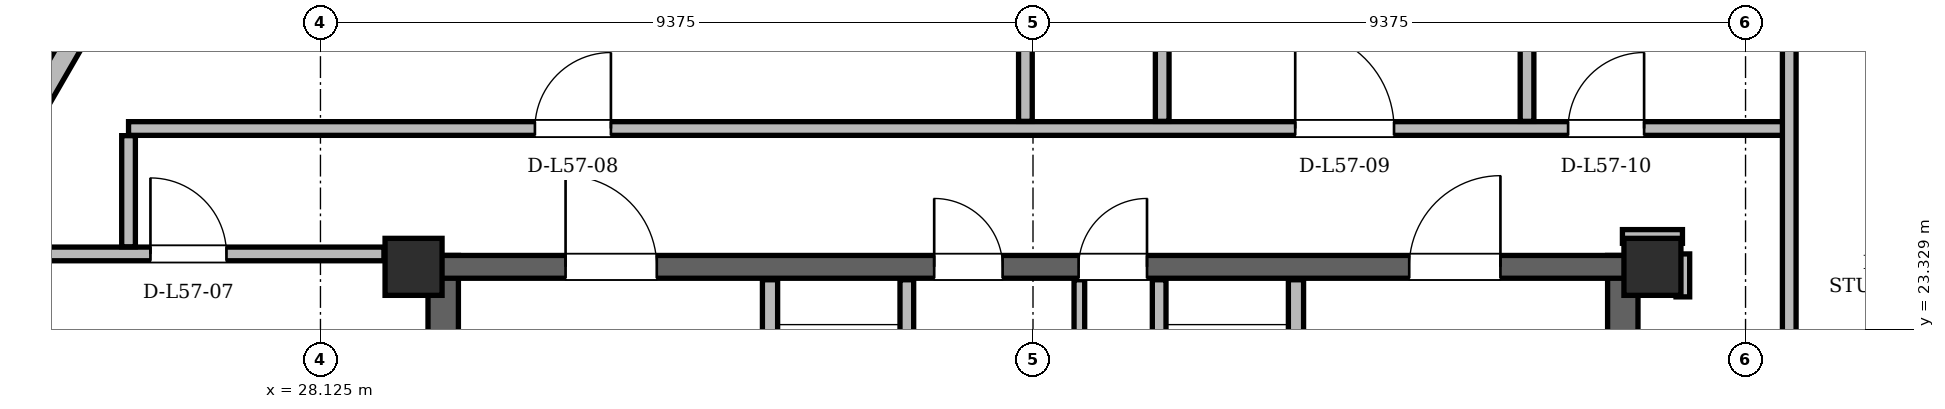
"""IFC4 building model, lengths in metres.
Left out: names, types, materials, properties, quantities, classifications, styles, units other than length and angle.
Written with IfcOpenShell. Run it as: python <this file> out.ifc"""

import sys

from ifc_helpers import new_model, si_unit, direction, frame, frame_2d, origin, origin_2d, place, context, subcontext, project, spatial, rectangle, hollow_rectangle, extrude, element, fill, save


model = new_model("IFC4")
c1 = context("Model", 3, precision=1e-05, world=origin(), true_north=direction((0.0, 1.0)))
c2 = subcontext(c1, "Body", "Model", "MODEL_VIEW")
j1 = project(units=[si_unit("LENGTHUNIT", "METRE"), si_unit("PLANEANGLEUNIT", "RADIAN")], contexts=[c1])
p1 = place(None, origin())
s1 = spatial("IfcSite", under=j1, at=p1, CompositionType="ELEMENT")
p2 = place(p1, origin())
s2 = spatial("IfcBuilding", under=s1, at=p2, CompositionType="ELEMENT")
p3 = place(p2, frame((0.0, 0.0, 216.3)))
s3 = spatial("IfcBuildingStorey", under=s2, at=p3, CompositionType="ELEMENT", Elevation=216.3)
for number, where, z_axis, x_axis in (
    (1, (45.65, 24.15, 0.0), (0.0, 0.0, 1.0), (1.0, 0.0, 0.0)),
    (2, (29.35, 24.15, 0.0), (0.0, 0.0, 1.0), (1.0, 0.0, 0.0)),
):
    element("IfcColumn", number, at=place(p3, frame(where, z_axis=z_axis, x_axis=x_axis)), inside=s3, PredefinedType="COLUMN", context=c2, shape_type="SweptSolid", body=[
        extrude(hollow_rectangle(XDim=0.75, YDim=0.75, WallThickness=0.06, at=origin_2d()), origin(), (0.0, 0.0, 1.0), 3.6),
    ])
for number, where, z_axis, x_axis in (
    (3, (29.74, 11.0, 0.0), (0.0, 0.0, 1.0), (0.0, 1.0, 0.0)),
    (4, (45.26, 11.0, 0.0), (0.0, 0.0, 1.0), (0.0, 1.0, 0.0)),
):
    element("IfcWall", number, at=place(p3, frame(where, z_axis=z_axis, x_axis=x_axis)), inside=s3, PredefinedType="SHEAR", context=c2, shape_type="SweptSolid", body=[
        extrude(rectangle(XDim=13.3, YDim=0.4, at=frame_2d((6.65, 0.0))), origin(), (0.0, 0.0, 1.0), 3.38),
    ])
p4 = place(p3, frame((29.65, 24.15, 0.0), z_axis=(0.0, 0.0, 1.0), x_axis=(1.0, 0.0, 0.0)))
e5 = element("IfcWall", 5, at=p4, inside=s3, PredefinedType="SHEAR", context=c2, shape_type="SweptSolid", body=[
    extrude(rectangle(XDim=15.7, YDim=0.3, at=frame_2d((7.85, 0.0))), origin(), (0.0, 0.0, 1.0), 3.38),
])
p5 = place(p4, frame((1.7, 0.0, 0.0)))
e6 = element("IfcOpeningElement", 6, at=p5, cuts=e5, PredefinedType="OPENING", context=c2, shape_type="SweptSolid", body=[
    extrude(rectangle(XDim=1.2, YDim=2.2, at=frame_2d((0.6, 1.1))), frame((0.0, 0.15, 0.0), z_axis=(0.0, -1.0, 0.0), x_axis=(1.0, 0.0, 0.0)), (0.0, 0.0, 1.0), 0.3),
])
p6 = place(p4, frame((12.8, 0.0, 0.0)))
e7 = element("IfcOpeningElement", 7, at=p6, cuts=e5, PredefinedType="OPENING", context=c2, shape_type="SweptSolid", body=[
    extrude(rectangle(XDim=1.2, YDim=2.2, at=frame_2d((0.6, 1.1))), frame((0.0, 0.15, 0.0), z_axis=(0.0, -1.0, 0.0), x_axis=(1.0, 0.0, 0.0)), (0.0, 0.0, 1.0), 0.3),
])
p7 = place(p4, frame((6.55, 0.0, 0.0)))
e8 = element("IfcOpeningElement", 8, at=p7, cuts=e5, PredefinedType="OPENING", context=c2, shape_type="SweptSolid", body=[
    extrude(rectangle(XDim=0.9, YDim=2.05, at=frame_2d((0.45, 1.025))), frame((0.0, 0.15, 0.0), z_axis=(0.0, -1.0, 0.0), x_axis=(1.0, 0.0, 0.0)), (0.0, 0.0, 1.0), 0.3),
])
p8 = place(p4, frame((8.45, 0.0, 0.0)))
e9 = element("IfcOpeningElement", 9, at=p8, cuts=e5, PredefinedType="OPENING", context=c2, shape_type="SweptSolid", body=[
    extrude(rectangle(XDim=0.9, YDim=2.05, at=frame_2d((0.45, 1.025))), frame((0.0, 0.15, 0.0), z_axis=(0.0, -1.0, 0.0), x_axis=(1.0, 0.0, 0.0)), (0.0, 0.0, 1.0), 0.3),
])
p9 = place(p3, frame((59.157, 11.485, 0.0), z_axis=(0.0, 0.0, 1.0), x_axis=(-0.500000353019, 0.866025199969, 0.0)))
e10 = element("IfcWall", 10, at=p9, inside=s3, PredefinedType="SOLIDWALL", context=c2, shape_type="SweptSolid", body=[
    extrude(rectangle(XDim=36.579, YDim=0.29, at=frame_2d((18.289, 0.0))), origin(), (0.0, 0.0, 1.0), 2.677),
])
p10 = place(p9, frame((3.429, 0.0, 0.0)))
e11 = element("IfcOpeningElement", 11, at=p10, cuts=e10, PredefinedType="OPENING", context=c2, shape_type="SweptSolid", body=[
    extrude(rectangle(XDim=1.5, YDim=2.2, at=frame_2d((0.75, 1.1))), frame((0.0, 0.145, 0.0), z_axis=(0.0, -1.0, 0.0), x_axis=(1.0, 0.0, 0.0)), (0.0, 0.0, 1.0), 0.29),
])
p11 = place(p9, frame((27.044, 0.0, 0.0)))
e12 = element("IfcOpeningElement", 12, at=p11, cuts=e10, PredefinedType="OPENING", context=c2, shape_type="SweptSolid", body=[
    extrude(rectangle(XDim=1.5, YDim=2.2, at=frame_2d((0.75, 1.1))), frame((0.0, 0.145, 0.0), z_axis=(0.0, -1.0, 0.0), x_axis=(1.0, 0.0, 0.0)), (0.0, 0.0, 1.0), 0.29),
])
p12 = place(p9, frame((7.913, 0.0, 0.85)))
e13 = element("IfcOpeningElement", 13, at=p12, cuts=e10, PredefinedType="OPENING", context=c2, shape_type="SweptSolid", body=[
    extrude(rectangle(XDim=1.2, YDim=1.48, at=frame_2d((0.6, 0.74))), frame((0.0, 0.145, 0.0), z_axis=(0.0, -1.0, 0.0), x_axis=(1.0, 0.0, 0.0)), (0.0, 0.0, 1.0), 0.29),
])
p13 = place(p9, frame((1.258, 0.0, 0.85)))
e14 = element("IfcOpeningElement", 14, at=p13, cuts=e10, PredefinedType="OPENING", context=c2, shape_type="SweptSolid", body=[
    extrude(rectangle(XDim=1.2, YDim=1.48, at=frame_2d((0.6, 0.74))), frame((0.0, 0.145, 0.0), z_axis=(0.0, -1.0, 0.0), x_axis=(1.0, 0.0, 0.0)), (0.0, 0.0, 1.0), 0.29),
])
p14 = place(p9, frame((12.2, 0.0, 0.85)))
e15 = element("IfcOpeningElement", 15, at=p14, cuts=e10, PredefinedType="OPENING", context=c2, shape_type="SweptSolid", body=[
    extrude(rectangle(XDim=2.0, YDim=1.717, at=frame_2d((1.0, 0.858))), frame((0.0, 0.145, 0.0), z_axis=(0.0, -1.0, 0.0), x_axis=(1.0, 0.0, 0.0)), (0.0, 0.0, 1.0), 0.29),
])
p15 = place(p9, frame((17.302, 0.0, 0.85)))
e16 = element("IfcOpeningElement", 16, at=p15, cuts=e10, PredefinedType="OPENING", context=c2, shape_type="SweptSolid", body=[
    extrude(rectangle(XDim=1.4, YDim=1.6, at=frame_2d((0.7, 0.8))), frame((0.0, 0.145, 0.0), z_axis=(0.0, -1.0, 0.0), x_axis=(1.0, 0.0, 0.0)), (0.0, 0.0, 1.0), 0.29),
])
p16 = place(p9, frame((20.753, 0.0, 0.85)))
e17 = element("IfcOpeningElement", 17, at=p16, cuts=e10, PredefinedType="OPENING", context=c2, shape_type="SweptSolid", body=[
    extrude(rectangle(XDim=1.2, YDim=1.48, at=frame_2d((0.6, 0.74))), frame((0.0, 0.145, 0.0), z_axis=(0.0, -1.0, 0.0), x_axis=(1.0, 0.0, 0.0)), (0.0, 0.0, 1.0), 0.29),
])
p17 = place(p9, frame((34.201, 0.0, 0.85)))
e18 = element("IfcOpeningElement", 18, at=p17, cuts=e10, PredefinedType="OPENING", context=c2, shape_type="SweptSolid", body=[
    extrude(rectangle(XDim=1.2, YDim=1.48, at=frame_2d((0.6, 0.74))), frame((0.0, 0.145, 0.0), z_axis=(0.0, -1.0, 0.0), x_axis=(1.0, 0.0, 0.0)), (0.0, 0.0, 1.0), 0.29),
])
p18 = place(p3, frame((34.132, 43.163, 0.0), z_axis=(0.0, 0.0, 1.0), x_axis=(-0.500000353019, -0.866025199969, 0.0)))
e19 = element("IfcWall", 19, at=p18, inside=s3, PredefinedType="SOLIDWALL", context=c2, shape_type="SweptSolid", body=[
    extrude(rectangle(XDim=36.579, YDim=0.29, at=frame_2d((18.289, 0.0))), origin(), (0.0, 0.0, 1.0), 2.677),
])
p19 = place(p18, frame((3.429, 0.0, 0.0)))
e20 = element("IfcOpeningElement", 20, at=p19, cuts=e19, PredefinedType="OPENING", context=c2, shape_type="SweptSolid", body=[
    extrude(rectangle(XDim=1.5, YDim=2.2, at=frame_2d((0.75, 1.1))), frame((0.0, 0.145, 0.0), z_axis=(0.0, -1.0, 0.0), x_axis=(1.0, 0.0, 0.0)), (0.0, 0.0, 1.0), 0.29),
])
p20 = place(p18, frame((27.044, 0.0, 0.0)))
e21 = element("IfcOpeningElement", 21, at=p20, cuts=e19, PredefinedType="OPENING", context=c2, shape_type="SweptSolid", body=[
    extrude(rectangle(XDim=1.5, YDim=2.2, at=frame_2d((0.75, 1.1))), frame((0.0, 0.145, 0.0), z_axis=(0.0, -1.0, 0.0), x_axis=(1.0, 0.0, 0.0)), (0.0, 0.0, 1.0), 0.29),
])
p21 = place(p18, frame((22.914, 0.0, 0.85)))
e22 = element("IfcOpeningElement", 22, at=p21, cuts=e19, PredefinedType="OPENING", context=c2, shape_type="SweptSolid", body=[
    extrude(rectangle(XDim=1.2, YDim=1.48, at=frame_2d((0.6, 0.74))), frame((0.0, 0.145, 0.0), z_axis=(0.0, -1.0, 0.0), x_axis=(1.0, 0.0, 0.0)), (0.0, 0.0, 1.0), 0.29),
])
p22 = place(p18, frame((33.08, 0.0, 0.85)))
e23 = element("IfcOpeningElement", 23, at=p22, cuts=e19, PredefinedType="OPENING", context=c2, shape_type="SweptSolid", body=[
    extrude(rectangle(XDim=1.2, YDim=1.48, at=frame_2d((0.6, 0.74))), frame((0.0, 0.145, 0.0), z_axis=(0.0, -1.0, 0.0), x_axis=(1.0, 0.0, 0.0)), (0.0, 0.0, 1.0), 0.29),
])
p23 = place(p18, frame((8.479, 0.0, 0.85)))
e24 = element("IfcOpeningElement", 24, at=p23, cuts=e19, PredefinedType="OPENING", context=c2, shape_type="SweptSolid", body=[
    extrude(rectangle(XDim=1.2, YDim=1.48, at=frame_2d((0.6, 0.74))), frame((0.0, 0.145, 0.0), z_axis=(0.0, -1.0, 0.0), x_axis=(1.0, 0.0, 0.0)), (0.0, 0.0, 1.0), 0.29),
])
p24 = place(p18, frame((15.537, 0.0, 0.85)))
e25 = element("IfcOpeningElement", 25, at=p24, cuts=e19, PredefinedType="OPENING", context=c2, shape_type="SweptSolid", body=[
    extrude(rectangle(XDim=2.8, YDim=1.717, at=frame_2d((1.4, 0.858))), frame((0.0, 0.145, 0.0), z_axis=(0.0, -1.0, 0.0), x_axis=(1.0, 0.0, 0.0)), (0.0, 0.0, 1.0), 0.29),
])
p25 = place(p18, frame((1.501, 0.0, 0.85)))
e26 = element("IfcOpeningElement", 26, at=p25, cuts=e19, PredefinedType="OPENING", context=c2, shape_type="SweptSolid", body=[
    extrude(rectangle(XDim=1.2, YDim=1.48, at=frame_2d((0.6, 0.74))), frame((0.0, 0.145, 0.0), z_axis=(0.0, -1.0, 0.0), x_axis=(1.0, 0.0, 0.0)), (0.0, 0.0, 1.0), 0.29),
])
p26 = place(p3, frame((34.04, 19.48, 0.0), z_axis=(0.0, 0.0, 1.0), x_axis=(0.0, 1.0, 0.0)))
e27 = element("IfcWall", 27, at=p26, inside=s3, PredefinedType="PARTITIONING", context=c2, shape_type="SweptSolid", body=[
    extrude(rectangle(XDim=4.5, YDim=0.2, at=frame_2d((2.25, 0.0))), origin(), (0.0, 0.0, 1.0), 3.38),
])
p27 = place(p26, frame((2.12, 0.0, 0.0)))
e28 = element("IfcOpeningElement", 28, at=p27, cuts=e27, PredefinedType="OPENING", context=c2, shape_type="SweptSolid", body=[
    extrude(rectangle(XDim=1.1, YDim=2.2, at=frame_2d((0.55, 1.1))), frame((0.0, 0.1, 0.0), z_axis=(0.0, -1.0, 0.0), x_axis=(1.0, 0.0, 0.0)), (0.0, 0.0, 1.0), 0.2),
])
p28 = place(p3, frame((35.84, 20.96, 0.0), z_axis=(0.0, 0.0, 1.0), x_axis=(0.0, 1.0, 0.0)))
e29 = element("IfcWall", 29, at=p28, inside=s3, PredefinedType="PARTITIONING", context=c2, shape_type="SweptSolid", body=[
    extrude(rectangle(XDim=3.02, YDim=0.18, at=frame_2d((1.51, 0.0))), origin(), (0.0, 0.0, 1.0), 3.38),
])
p29 = place(p3, frame((40.96, 19.48, 0.0), z_axis=(0.0, 0.0, 1.0), x_axis=(0.0, 1.0, 0.0)))
e30 = element("IfcWall", 30, at=p29, inside=s3, PredefinedType="PARTITIONING", context=c2, shape_type="SweptSolid", body=[
    extrude(rectangle(XDim=4.5, YDim=0.2, at=frame_2d((2.25, 0.0))), origin(), (0.0, 0.0, 1.0), 3.38),
])
p30 = place(p29, frame((2.12, 0.0, 0.0)))
e31 = element("IfcOpeningElement", 31, at=p30, cuts=e30, PredefinedType="OPENING", context=c2, shape_type="SweptSolid", body=[
    extrude(rectangle(XDim=1.1, YDim=2.2, at=frame_2d((0.55, 1.1))), frame((0.0, 0.1, 0.0), z_axis=(0.0, -1.0, 0.0), x_axis=(1.0, 0.0, 0.0)), (0.0, 0.0, 1.0), 0.2),
])
p31 = place(p3, frame((39.16, 20.96, 0.0), z_axis=(0.0, 0.0, 1.0), x_axis=(0.0, 1.0, 0.0)))
e32 = element("IfcWall", 32, at=p31, inside=s3, PredefinedType="PARTITIONING", context=c2, shape_type="SweptSolid", body=[
    extrude(rectangle(XDim=3.02, YDim=0.18, at=frame_2d((1.51, 0.0))), origin(), (0.0, 0.0, 1.0), 3.38),
])
p32 = place(p3, frame((38.11, 21.06, 0.0), z_axis=(0.0, 0.0, 1.0), x_axis=(0.0, 1.0, 0.0)))
e33 = element("IfcWall", 33, at=p32, inside=s3, PredefinedType="PARTITIONING", context=c2, shape_type="SweptSolid", body=[
    extrude(rectangle(XDim=2.92, YDim=0.14, at=frame_2d((1.46, 0.0))), origin(), (0.0, 0.0, 1.0), 3.38),
])
p33 = place(p3, frame((23.425, 24.32, 0.0), z_axis=(0.0, 0.0, 1.0), x_axis=(1.0, 0.0, 0.0)))
e34 = element("IfcWall", 34, at=p33, inside=s3, PredefinedType="PARTITIONING", context=c2, shape_type="SweptSolid", body=[
    extrude(rectangle(XDim=5.535, YDim=0.18, at=frame_2d((2.768, 0.0))), origin(), (0.0, 0.0, 1.0), 3.38),
])
p34 = place(p33, frame((2.463, 0.0, 0.0)))
e35 = element("IfcOpeningElement", 35, at=p34, cuts=e34, PredefinedType="OPENING", context=c2, shape_type="SweptSolid", body=[
    extrude(rectangle(XDim=1.0, YDim=2.18, at=frame_2d((0.5, 1.09))), frame((0.0, 0.09, 0.0), z_axis=(0.0, -1.0, 0.0), x_axis=(1.0, 0.0, 0.0)), (0.0, 0.0, 1.0), 0.18),
])
p35 = place(p3, frame((45.255, 24.55, 0.0), z_axis=(0.0, 0.0, 1.0), x_axis=(1.0, 0.0, 0.0)))
e36 = element("IfcWall", 36, at=p35, inside=s3, PredefinedType="PARTITIONING", context=c2, shape_type="SweptSolid", body=[
    extrude(rectangle(XDim=0.79, YDim=0.18, at=frame_2d((0.395, 0.0))), origin(), (0.0, 0.0, 1.0), 2.913),
])
p36 = place(p3, frame((25.6, 25.97, 0.0), z_axis=(0.0, 0.0, 1.0), x_axis=(1.0, 0.0, 0.0)))
e37 = element("IfcWall", 37, at=p36, inside=s3, PredefinedType="PARTITIONING", context=c2, shape_type="SweptSolid", body=[
    extrude(rectangle(XDim=21.85, YDim=0.18, at=frame_2d((10.925, 0.0))), origin(), (0.0, 0.0, 1.0), 2.913),
])
p37 = place(p36, frame((5.347, 0.0, 0.0)))
e38 = element("IfcOpeningElement", 38, at=p37, cuts=e37, PredefinedType="OPENING", context=c2, shape_type="SweptSolid", body=[
    extrude(rectangle(XDim=1.0, YDim=2.18, at=frame_2d((0.5, 1.09))), frame((0.0, 0.09, 0.0), z_axis=(0.0, -1.0, 0.0), x_axis=(1.0, 0.0, 0.0)), (0.0, 0.0, 1.0), 0.18),
])
p38 = place(p36, frame((15.35, 0.0, 0.0)))
e39 = element("IfcOpeningElement", 39, at=p38, cuts=e37, PredefinedType="OPENING", context=c2, shape_type="SweptSolid", body=[
    extrude(rectangle(XDim=1.3, YDim=2.2, at=frame_2d((0.65, 1.1))), frame((0.0, 0.09, 0.0), z_axis=(0.0, -1.0, 0.0), x_axis=(1.0, 0.0, 0.0)), (0.0, 0.0, 1.0), 0.18),
])
p39 = place(p36, frame((18.94, 0.0, 0.0)))
e40 = element("IfcOpeningElement", 40, at=p39, cuts=e37, PredefinedType="OPENING", context=c2, shape_type="SweptSolid", body=[
    extrude(rectangle(XDim=1.0, YDim=2.18, at=frame_2d((0.5, 1.09))), frame((0.0, 0.09, 0.0), z_axis=(0.0, -1.0, 0.0), x_axis=(1.0, 0.0, 0.0)), (0.0, 0.0, 1.0), 0.18),
])
p40 = place(p3, frame((25.6, 24.414, 0.0), z_axis=(0.0, 0.0, 1.0), x_axis=(0.0, 1.0, 0.0)))
e41 = element("IfcWall", 41, at=p40, inside=s3, PredefinedType="PARTITIONING", context=c2, shape_type="SweptSolid", body=[
    extrude(rectangle(XDim=1.462, YDim=0.18, at=frame_2d((0.731, 0.0))), origin(), (0.0, 0.0, 1.0), 3.38),
])
p41 = place(p3, frame((37.4, 26.064, 0.0), z_axis=(0.0, 0.0, 1.0), x_axis=(0.0, 1.0, 0.0)))
e42 = element("IfcWall", 42, at=p41, inside=s3, PredefinedType="PARTITIONING", context=c2, shape_type="SweptSolid", body=[
    extrude(rectangle(XDim=16.95, YDim=0.18, at=frame_2d((8.475, 0.0))), origin(), (0.0, 0.0, 1.0), 3.38),
])
p42 = place(p3, frame((39.2, 26.064, 0.0), z_axis=(0.0, 0.0, 1.0), x_axis=(0.0, 1.0, 0.0)))
e43 = element("IfcWall", 43, at=p42, inside=s3, PredefinedType="PARTITIONING", context=c2, shape_type="SweptSolid", body=[
    extrude(rectangle(XDim=4.312, YDim=0.18, at=frame_2d((2.156, 0.0))), origin(), (0.0, 0.0, 1.0), 3.38),
])
p43 = place(p3, frame((44.0, 26.064, 0.0), z_axis=(0.0, 0.0, 1.0), x_axis=(0.0, 1.0, 0.0)))
e44 = element("IfcWall", 44, at=p43, inside=s3, PredefinedType="PARTITIONING", context=c2, shape_type="SweptSolid", body=[
    extrude(rectangle(XDim=4.312, YDim=0.18, at=frame_2d((2.156, 0.0))), origin(), (0.0, 0.0, 1.0), 2.913),
])
p44 = place(p3, frame((46.05, 23.755, 0.0), z_axis=(0.0, 0.0, 1.0), x_axis=(0.0, 1.0, 0.0)))
e45 = element("IfcWall", 45, at=p44, inside=s3, PredefinedType="PARTITIONING", context=c2, shape_type="SweptSolid", body=[
    extrude(rectangle(XDim=0.565, YDim=0.18, at=frame_2d((0.283, 0.0))), origin(), (0.0, 0.0, 1.0), 3.38),
])
p45 = place(p3, frame((47.45, 5.801, 0.0), z_axis=(0.0, 0.0, 1.0), x_axis=(0.0, 1.0, 0.0)))
e46 = element("IfcWall", 46, at=p45, inside=s3, PredefinedType="PARTITIONING", context=c2, shape_type="SweptSolid", body=[
    extrude(rectangle(XDim=25.664, YDim=0.18, at=frame_2d((12.832, 0.0))), origin(), (0.0, 0.0, 1.0), 2.913),
])
p46 = place(p45, frame((9.122, 0.0, 0.0)))
e47 = element("IfcOpeningElement", 47, at=p46, cuts=e46, PredefinedType="OPENING", context=c2, shape_type="SweptSolid", body=[
    extrude(rectangle(XDim=1.0, YDim=2.18, at=frame_2d((0.5, 1.09))), frame((0.0, 0.09, 0.0), z_axis=(0.0, -1.0, 0.0), x_axis=(1.0, 0.0, 0.0)), (0.0, 0.0, 1.0), 0.18),
])
p47 = place(p45, frame((15.912, 0.0, 0.0)))
e48 = element("IfcOpeningElement", 48, at=p47, cuts=e46, PredefinedType="OPENING", context=c2, shape_type="SweptSolid", body=[
    extrude(rectangle(XDim=1.0, YDim=2.18, at=frame_2d((0.5, 1.09))), frame((0.0, 0.09, 0.0), z_axis=(0.0, -1.0, 0.0), x_axis=(1.0, 0.0, 0.0)), (0.0, 0.0, 1.0), 0.18),
])
p48 = place(p5, origin())
e49 = element("IfcDoor", 49, at=p48, inside=s3, OperationType="SINGLE_SWING_LEFT", PredefinedType="DOOR", context=c2, shape_type="SweptSolid", body=[
    extrude(rectangle(XDim=1.2, YDim=2.2, at=frame_2d((0.6, 1.1))), frame((0.0, 0.025, 0.0), z_axis=(0.0, -1.0, 0.0), x_axis=(1.0, 0.0, 0.0)), (0.0, 0.0, 1.0), 0.05),
])
fill(e6, e49)
p49 = place(p6, origin())
e50 = element("IfcDoor", 50, at=p49, inside=s3, OperationType="SINGLE_SWING_RIGHT", PredefinedType="DOOR", context=c2, shape_type="SweptSolid", body=[
    extrude(rectangle(XDim=1.2, YDim=2.2, at=frame_2d((0.6, 1.1))), frame((0.0, 0.025, 0.0), z_axis=(0.0, -1.0, 0.0), x_axis=(1.0, 0.0, 0.0)), (0.0, 0.0, 1.0), 0.05),
])
fill(e7, e50)
p50 = place(p7, origin())
e51 = element("IfcDoor", 51, at=p50, inside=s3, OperationType="SINGLE_SWING_LEFT", PredefinedType="DOOR", context=c2, shape_type="SweptSolid", body=[
    extrude(rectangle(XDim=0.9, YDim=2.05, at=frame_2d((0.45, 1.025))), frame((0.0, 0.025, 0.0), z_axis=(0.0, -1.0, 0.0), x_axis=(1.0, 0.0, 0.0)), (0.0, 0.0, 1.0), 0.05),
])
fill(e8, e51)
p51 = place(p8, origin())
e52 = element("IfcDoor", 52, at=p51, inside=s3, OperationType="SINGLE_SWING_RIGHT", PredefinedType="DOOR", context=c2, shape_type="SweptSolid", body=[
    extrude(rectangle(XDim=0.9, YDim=2.05, at=frame_2d((0.45, 1.025))), frame((0.0, 0.025, 0.0), z_axis=(0.0, -1.0, 0.0), x_axis=(1.0, 0.0, 0.0)), (0.0, 0.0, 1.0), 0.05),
])
fill(e9, e52)
p52 = place(p34, origin())
e53 = element("IfcDoor", 53, at=p52, inside=s3, OperationType="SINGLE_SWING_LEFT", PredefinedType="DOOR", context=c2, shape_type="SweptSolid", body=[
    extrude(rectangle(XDim=1.0, YDim=2.18, at=frame_2d((0.5, 1.09))), frame((0.0, 0.025, 0.0), z_axis=(0.0, -1.0, 0.0), x_axis=(1.0, 0.0, 0.0)), (0.0, 0.0, 1.0), 0.05),
])
fill(e35, e53)
p53 = place(p37, origin())
e54 = element("IfcDoor", 54, at=p53, inside=s3, OperationType="SINGLE_SWING_RIGHT", PredefinedType="DOOR", context=c2, shape_type="SweptSolid", body=[
    extrude(rectangle(XDim=1.0, YDim=2.18, at=frame_2d((0.5, 1.09))), frame((0.0, 0.025, 0.0), z_axis=(0.0, -1.0, 0.0), x_axis=(1.0, 0.0, 0.0)), (0.0, 0.0, 1.0), 0.05),
])
fill(e38, e54)
p54 = place(p38, origin())
e55 = element("IfcDoor", 55, at=p54, inside=s3, OperationType="SINGLE_SWING_LEFT", PredefinedType="DOOR", context=c2, shape_type="SweptSolid", body=[
    extrude(rectangle(XDim=1.3, YDim=2.2, at=frame_2d((0.65, 1.1))), frame((0.0, 0.025, 0.0), z_axis=(0.0, -1.0, 0.0), x_axis=(1.0, 0.0, 0.0)), (0.0, 0.0, 1.0), 0.05),
])
fill(e39, e55)
p55 = place(p39, origin())
e56 = element("IfcDoor", 56, at=p55, inside=s3, OperationType="SINGLE_SWING_RIGHT", PredefinedType="DOOR", context=c2, shape_type="SweptSolid", body=[
    extrude(rectangle(XDim=1.0, YDim=2.18, at=frame_2d((0.5, 1.09))), frame((0.0, 0.025, 0.0), z_axis=(0.0, -1.0, 0.0), x_axis=(1.0, 0.0, 0.0)), (0.0, 0.0, 1.0), 0.05),
])
fill(e40, e56)
save(model, sys.argv[1])
